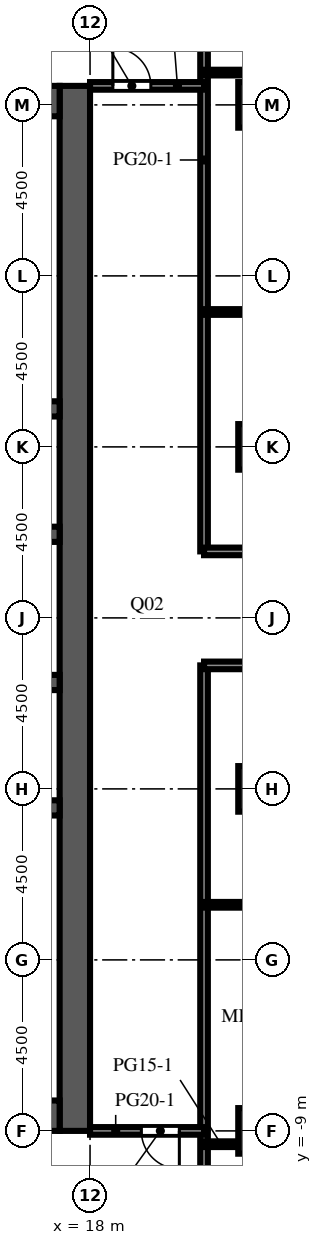
"""IFC4 building model, lengths in metres.
Left out: names, types, materials, properties, quantities, classifications, styles, units other than length and angle.
Written with IfcOpenShell. Run it as: python <this file> out.ifc"""

import sys

from ifc_helpers import new_model, si_unit, direction, frame, frame_2d, origin, origin_2d, place, context, subcontext, project, spatial, rectangle, extrude, element, fill, save


model = new_model("IFC4")
c1 = context("Model", 3, precision=1e-05, world=origin(), true_north=direction((0.0, 1.0)))
c2 = subcontext(c1, "Body", "Model", "MODEL_VIEW")
j1 = project(units=[si_unit("LENGTHUNIT", "METRE"), si_unit("PLANEANGLEUNIT", "RADIAN")], contexts=[c1])
p1 = place(None, origin())
s1 = spatial("IfcSite", under=j1, at=p1, CompositionType="ELEMENT")
p2 = place(p1, origin())
s2 = spatial("IfcBuilding", under=s1, at=p2, CompositionType="ELEMENT")
p3 = place(p2, frame((0.0, 0.0, 203.8)))
s3 = spatial("IfcBuildingStorey", under=s2, at=p3, CompositionType="ELEMENT", Elevation=203.8)
for number, where, z_axis, x_axis in (
    (1, (22.5, -9.0, 0.0), (0.0, 0.0, 1.0), (1.0, 0.0, 0.0)),
    (2, (22.5, 0.0, 0.0), (0.0, 0.0, 1.0), (1.0, 0.0, 0.0)),
    (3, (22.5, 9.0, 0.0), (0.0, 0.0, 1.0), (1.0, 0.0, 0.0)),
    (4, (22.5, 18.0, 0.0), (0.0, 0.0, 1.0), (1.0, 0.0, 0.0)),
):
    element("IfcColumn", number, at=place(p3, frame(where, z_axis=z_axis, x_axis=x_axis)), inside=s3, PredefinedType="COLUMN", context=c2, shape_type="SweptSolid", body=[
        extrude(rectangle(XDim=1.2, YDim=1.2, at=origin_2d()), origin(), (0.0, 0.0, 1.0), 4.1),
    ])
p4 = place(p3, frame((17.6, -9.0, 0.0), z_axis=(0.0, 0.0, 1.0), x_axis=(0.0, 1.0, 0.0)))
e5 = element("IfcWall", 5, at=p4, inside=s3, PredefinedType="SHEAR", context=c2, shape_type="SweptSolid", body=[
    extrude(rectangle(XDim=27.5, YDim=0.8, at=frame_2d((13.75, 0.0))), origin(), (0.0, 0.0, 1.0), 4.1),
])
p5 = place(p4, frame((12.55, 0.0, 0.0)))
e6 = element("IfcOpeningElement", 6, at=p5, cuts=e5, PredefinedType="OPENING", context=c2, shape_type="SweptSolid", body=[
    extrude(rectangle(XDim=2.4, YDim=2.4, at=frame_2d((1.2, 1.2))), frame((0.0, 0.41, 0.0), z_axis=(0.0, -1.0, 0.0), x_axis=(1.0, 0.0, 0.0)), (0.0, 0.0, 1.0), 0.82),
])
p6 = place(p4, frame((6.825, 0.0, 0.0)))
e7 = element("IfcOpeningElement", 7, at=p6, cuts=e5, PredefinedType="OPENING", context=c2, shape_type="SweptSolid", body=[
    extrude(rectangle(XDim=1.2, YDim=2.1, at=frame_2d((0.6, 1.05))), frame((0.0, 0.41, 0.0), z_axis=(0.0, -1.0, 0.0), x_axis=(1.0, 0.0, 0.0)), (0.0, 0.0, 1.0), 0.82),
])
p7 = place(p4, frame((19.475, 0.0, 0.0)))
e8 = element("IfcOpeningElement", 8, at=p7, cuts=e5, PredefinedType="OPENING", context=c2, shape_type="SweptSolid", body=[
    extrude(rectangle(XDim=1.2, YDim=2.1, at=frame_2d((0.6, 1.05))), frame((0.0, 0.41, 0.0), z_axis=(0.0, -1.0, 0.0), x_axis=(1.0, 0.0, 0.0)), (0.0, 0.0, 1.0), 0.82),
])
for number, where, z_axis, x_axis in (
    (9, (6.8, -8.6, 0.0), (0.0, 0.0, 1.0), (1.0, 0.0, 0.0)),
    (10, (6.8, 18.1, 0.0), (0.0, 0.0, 1.0), (1.0, 0.0, 0.0)),
):
    element("IfcWall", number, at=place(p3, frame(where, z_axis=z_axis, x_axis=x_axis)), inside=s3, PredefinedType="SHEAR", context=c2, shape_type="SweptSolid", body=[
        extrude(rectangle(XDim=10.4, YDim=0.8, at=frame_2d((5.2, 0.0))), origin(), (0.0, 0.0, 1.0), 4.1),
    ])
p8 = place(p3, frame((6.8, -0.5, 0.0), z_axis=(0.0, 0.0, 1.0), x_axis=(1.0, 0.0, 0.0)))
e11 = element("IfcWall", 11, at=p8, inside=s3, PredefinedType="SHEAR", context=c2, shape_type="SweptSolid", body=[
    extrude(rectangle(XDim=10.4, YDim=0.4, at=frame_2d((5.2, 0.0))), origin(), (0.0, 0.0, 1.0), 4.1),
])
p9 = place(p3, frame((6.8, 2.8, 0.0), z_axis=(0.0, 0.0, 1.0), x_axis=(1.0, 0.0, 0.0)))
e12 = element("IfcWall", 12, at=p9, inside=s3, PredefinedType="SHEAR", context=c2, shape_type="SweptSolid", body=[
    extrude(rectangle(XDim=10.4, YDim=0.4, at=frame_2d((5.2, 0.0))), origin(), (0.0, 0.0, 1.0), 4.1),
])
p10 = place(p9, frame((0.738, 0.0, 0.0)))
e13 = element("IfcOpeningElement", 13, at=p10, cuts=e12, PredefinedType="OPENING", context=c2, shape_type="SweptSolid", body=[
    extrude(rectangle(XDim=1.1, YDim=2.1, at=frame_2d((0.55, 1.05))), frame((0.0, 0.21, 0.0), z_axis=(0.0, -1.0, 0.0), x_axis=(1.0, 0.0, 0.0)), (0.0, 0.0, 1.0), 0.42),
])
p11 = place(p9, frame((3.337, 0.0, 0.0)))
e14 = element("IfcOpeningElement", 14, at=p11, cuts=e12, PredefinedType="OPENING", context=c2, shape_type="SweptSolid", body=[
    extrude(rectangle(XDim=1.1, YDim=2.1, at=frame_2d((0.55, 1.05))), frame((0.0, 0.21, 0.0), z_axis=(0.0, -1.0, 0.0), x_axis=(1.0, 0.0, 0.0)), (0.0, 0.0, 1.0), 0.42),
])
p12 = place(p9, frame((6.012, 0.0, 0.0)))
e15 = element("IfcOpeningElement", 15, at=p12, cuts=e12, PredefinedType="OPENING", context=c2, shape_type="SweptSolid", body=[
    extrude(rectangle(XDim=1.0, YDim=2.1, at=frame_2d((0.5, 1.05))), frame((0.0, 0.21, 0.0), z_axis=(0.0, -1.0, 0.0), x_axis=(1.0, 0.0, 0.0)), (0.0, 0.0, 1.0), 0.42),
])
p13 = place(p9, frame((8.613, 0.0, 0.0)))
e16 = element("IfcOpeningElement", 16, at=p13, cuts=e12, PredefinedType="OPENING", context=c2, shape_type="SweptSolid", body=[
    extrude(rectangle(XDim=1.0, YDim=2.1, at=frame_2d((0.5, 1.05))), frame((0.0, 0.21, 0.0), z_axis=(0.0, -1.0, 0.0), x_axis=(1.0, 0.0, 0.0)), (0.0, 0.0, 1.0), 0.42),
])
p14 = place(p3, frame((6.8, 6.7, 0.0), z_axis=(0.0, 0.0, 1.0), x_axis=(1.0, 0.0, 0.0)))
e17 = element("IfcWall", 17, at=p14, inside=s3, PredefinedType="SHEAR", context=c2, shape_type="SweptSolid", body=[
    extrude(rectangle(XDim=10.4, YDim=0.4, at=frame_2d((5.2, 0.0))), origin(), (0.0, 0.0, 1.0), 4.1),
])
p15 = place(p14, frame((3.337, 0.0, 0.0)))
e18 = element("IfcOpeningElement", 18, at=p15, cuts=e17, PredefinedType="OPENING", context=c2, shape_type="SweptSolid", body=[
    extrude(rectangle(XDim=1.1, YDim=2.1, at=frame_2d((0.55, 1.05))), frame((0.0, 0.21, 0.0), z_axis=(0.0, -1.0, 0.0), x_axis=(1.0, 0.0, 0.0)), (0.0, 0.0, 1.0), 0.42),
])
p16 = place(p14, frame((5.962, 0.0, 0.0)))
e19 = element("IfcOpeningElement", 19, at=p16, cuts=e17, PredefinedType="OPENING", context=c2, shape_type="SweptSolid", body=[
    extrude(rectangle(XDim=1.1, YDim=2.1, at=frame_2d((0.55, 1.05))), frame((0.0, 0.21, 0.0), z_axis=(0.0, -1.0, 0.0), x_axis=(1.0, 0.0, 0.0)), (0.0, 0.0, 1.0), 0.42),
])
p17 = place(p14, frame((8.663, 0.0, 0.0)))
e20 = element("IfcOpeningElement", 20, at=p17, cuts=e17, PredefinedType="OPENING", context=c2, shape_type="SweptSolid", body=[
    extrude(rectangle(XDim=1.1, YDim=2.1, at=frame_2d((0.55, 1.05))), frame((0.0, 0.21, 0.0), z_axis=(0.0, -1.0, 0.0), x_axis=(1.0, 0.0, 0.0)), (0.0, 0.0, 1.0), 0.42),
])
p18 = place(p14, frame((0.688, 0.0, 0.0)))
e21 = element("IfcOpeningElement", 21, at=p18, cuts=e17, PredefinedType="OPENING", context=c2, shape_type="SweptSolid", body=[
    extrude(rectangle(XDim=1.0, YDim=2.1, at=frame_2d((0.5, 1.05))), frame((0.0, 0.21, 0.0), z_axis=(0.0, -1.0, 0.0), x_axis=(1.0, 0.0, 0.0)), (0.0, 0.0, 1.0), 0.42),
])
p19 = place(p3, frame((6.8, 10.0, 0.0), z_axis=(0.0, 0.0, 1.0), x_axis=(1.0, 0.0, 0.0)))
e22 = element("IfcWall", 22, at=p19, inside=s3, PredefinedType="SHEAR", context=c2, shape_type="SweptSolid", body=[
    extrude(rectangle(XDim=10.4, YDim=0.4, at=frame_2d((5.2, 0.0))), origin(), (0.0, 0.0, 1.0), 4.1),
])
p20 = place(p3, frame((21.0, -26.85, 0.0), z_axis=(0.0, 0.0, 1.0), x_axis=(0.0, 1.0, 0.0)))
e23 = element("IfcWall", 23, at=p20, inside=s3, PredefinedType="PARTITIONING", context=c2, shape_type="SweptSolid", body=[
    extrude(rectangle(XDim=30.1, YDim=0.2, at=frame_2d((15.05, 0.0))), origin(), (0.0, 0.0, 1.0), 3.65),
])
p21 = place(p3, frame((21.0, 6.25, 0.0), z_axis=(0.0, 0.0, 1.0), x_axis=(0.0, 1.0, 0.0)))
e24 = element("IfcWall", 24, at=p21, inside=s3, PredefinedType="PARTITIONING", context=c2, shape_type="SweptSolid", body=[
    extrude(rectangle(XDim=20.6, YDim=0.2, at=frame_2d((10.3, 0.0))), origin(), (0.0, 0.0, 1.0), 3.65),
])
p22 = place(p3, frame((21.0, -9.35, 0.0), z_axis=(0.0, 0.0, 1.0), x_axis=(1.0, 0.0, 0.0)))
e25 = element("IfcWall", 25, at=p22, inside=s3, PredefinedType="PARTITIONING", context=c2, shape_type="SweptSolid", body=[
    extrude(rectangle(XDim=0.9, YDim=0.15, at=frame_2d((0.45, 0.0))), origin(), (0.0, 0.0, 1.0), 3.65),
])
p23 = place(p3, frame((21.0, -9.0, 0.0), z_axis=(0.0, 0.0, 1.0), x_axis=(-1.0, 0.0, 0.0)))
e26 = element("IfcWall", 26, at=p23, inside=s3, PredefinedType="PARTITIONING", context=c2, shape_type="SweptSolid", body=[
    extrude(rectangle(XDim=3.0, YDim=0.2, at=frame_2d((1.5, 0.0))), origin(), (0.0, 0.0, 1.0), 3.65),
])
p24 = place(p23, frame((0.65, 0.0, 0.0)))
e27 = element("IfcOpeningElement", 27, at=p24, cuts=e26, PredefinedType="OPENING", context=c2, shape_type="SweptSolid", body=[
    extrude(rectangle(XDim=1.0, YDim=2.1, at=frame_2d((0.5, 1.05))), frame((0.0, 0.11, 0.0), z_axis=(0.0, -1.0, 0.0), x_axis=(1.0, 0.0, 0.0)), (0.0, 0.0, 1.0), 0.22),
])
p25 = place(p3, frame((31.35, -3.05, 0.0), z_axis=(0.0, 0.0, 1.0), x_axis=(-1.0, 0.0, 0.0)))
e28 = element("IfcWall", 28, at=p25, inside=s3, PredefinedType="PARTITIONING", context=c2, shape_type="SweptSolid", body=[
    extrude(rectangle(XDim=10.35, YDim=0.15, at=frame_2d((5.175, 0.0))), origin(), (0.0, 0.0, 1.0), 3.65),
])
p26 = place(p25, frame((4.25, 0.0, 0.0)))
e29 = element("IfcOpeningElement", 29, at=p26, cuts=e28, PredefinedType="OPENING", context=c2, shape_type="SweptSolid", body=[
    extrude(rectangle(XDim=1.0, YDim=2.1, at=frame_2d((0.5, 1.05))), frame((0.0, 0.085, 0.0), z_axis=(0.0, -1.0, 0.0), x_axis=(1.0, 0.0, 0.0)), (0.0, 0.0, 1.0), 0.17),
])
p27 = place(p3, frame((31.35, 3.25, 0.0), z_axis=(0.0, 0.0, 1.0), x_axis=(-1.0, 0.0, 0.0)))
e30 = element("IfcWall", 30, at=p27, inside=s3, PredefinedType="PARTITIONING", context=c2, shape_type="SweptSolid", body=[
    extrude(rectangle(XDim=10.35, YDim=0.2, at=frame_2d((5.175, 0.0))), origin(), (0.0, 0.0, 1.0), 3.65),
])
p28 = place(p27, frame((5.5, 0.0, 0.0)))
e31 = element("IfcOpeningElement", 31, at=p28, cuts=e30, PredefinedType="OPENING", context=c2, shape_type="SweptSolid", body=[
    extrude(rectangle(XDim=1.0, YDim=2.1, at=frame_2d((0.5, 1.05))), frame((0.0, 0.11, 0.0), z_axis=(0.0, -1.0, 0.0), x_axis=(1.0, 0.0, 0.0)), (0.0, 0.0, 1.0), 0.22),
])
p29 = place(p3, frame((21.0, 6.25, 0.0), z_axis=(0.0, 0.0, 1.0), x_axis=(1.0, 0.0, 0.0)))
e32 = element("IfcWall", 32, at=p29, inside=s3, PredefinedType="PARTITIONING", context=c2, shape_type="SweptSolid", body=[
    extrude(rectangle(XDim=10.35, YDim=0.2, at=frame_2d((5.175, 0.0))), origin(), (0.0, 0.0, 1.0), 3.65),
])
p30 = place(p29, frame((5.6, 0.0, 0.0)))
e33 = element("IfcOpeningElement", 33, at=p30, cuts=e32, PredefinedType="OPENING", context=c2, shape_type="SweptSolid", body=[
    extrude(rectangle(XDim=1.0, YDim=2.1, at=frame_2d((0.5, 1.05))), frame((0.0, 0.11, 0.0), z_axis=(0.0, -1.0, 0.0), x_axis=(1.0, 0.0, 0.0)), (0.0, 0.0, 1.0), 0.22),
])
p31 = place(p3, frame((21.0, 12.55, 0.0), z_axis=(0.0, 0.0, 1.0), x_axis=(1.0, 0.0, 0.0)))
e34 = element("IfcWall", 34, at=p31, inside=s3, PredefinedType="PARTITIONING", context=c2, shape_type="SweptSolid", body=[
    extrude(rectangle(XDim=10.35, YDim=0.15, at=frame_2d((5.175, 0.0))), origin(), (0.0, 0.0, 1.0), 3.65),
])
p32 = place(p31, frame((4.6, 0.0, 0.0)))
e35 = element("IfcOpeningElement", 35, at=p32, cuts=e34, PredefinedType="OPENING", context=c2, shape_type="SweptSolid", body=[
    extrude(rectangle(XDim=1.0, YDim=2.1, at=frame_2d((0.5, 1.05))), frame((0.0, 0.085, 0.0), z_axis=(0.0, -1.0, 0.0), x_axis=(1.0, 0.0, 0.0)), (0.0, 0.0, 1.0), 0.17),
])
p33 = place(p3, frame((18.0, 18.5, 0.0), z_axis=(0.0, 0.0, 1.0), x_axis=(1.0, 0.0, 0.0)))
e36 = element("IfcWall", 36, at=p33, inside=s3, PredefinedType="PARTITIONING", context=c2, shape_type="SweptSolid", body=[
    extrude(rectangle(XDim=3.0, YDim=0.2, at=frame_2d((1.5, 0.0))), origin(), (0.0, 0.0, 1.0), 3.65),
])
p34 = place(p33, frame((0.6, 0.0, 0.0)))
e37 = element("IfcOpeningElement", 37, at=p34, cuts=e36, PredefinedType="OPENING", context=c2, shape_type="SweptSolid", body=[
    extrude(rectangle(XDim=1.0, YDim=2.1, at=frame_2d((0.5, 1.05))), frame((0.0, 0.11, 0.0), z_axis=(0.0, -1.0, 0.0), x_axis=(1.0, 0.0, 0.0)), (0.0, 0.0, 1.0), 0.22),
])
p35 = place(p3, frame((21.0, 18.85, 0.0), z_axis=(0.0, 0.0, 1.0), x_axis=(1.0, 0.0, 0.0)))
e38 = element("IfcWall", 38, at=p35, inside=s3, PredefinedType="PARTITIONING", context=c2, shape_type="SweptSolid", body=[
    extrude(rectangle(XDim=10.35, YDim=0.15, at=frame_2d((5.175, 0.0))), origin(), (0.0, 0.0, 1.0), 3.65),
])
p36 = place(p35, frame((6.85, 0.0, 0.0)))
e39 = element("IfcOpeningElement", 39, at=p36, cuts=e38, PredefinedType="OPENING", context=c2, shape_type="SweptSolid", body=[
    extrude(rectangle(XDim=1.0, YDim=2.1, at=frame_2d((0.5, 1.05))), frame((0.0, 0.085, 0.0), z_axis=(0.0, -1.0, 0.0), x_axis=(1.0, 0.0, 0.0)), (0.0, 0.0, 1.0), 0.17),
])
p37 = place(p5, origin())
e40 = element("IfcDoor", 40, at=p37, inside=s3, OperationType="DOUBLE_DOOR_DOUBLE_SWING", PredefinedType="DOOR", context=c2, shape_type="SweptSolid", body=[
    extrude(rectangle(XDim=2.4, YDim=2.4, at=frame_2d((1.2, 1.2))), frame((0.0, 0.025, 0.0), z_axis=(0.0, -1.0, 0.0), x_axis=(1.0, 0.0, 0.0)), (0.0, 0.0, 1.0), 0.05),
])
fill(e6, e40)
p38 = place(p6, frame((1.2, 0.0, 0.0), z_axis=(0.0, 0.0, 1.0), x_axis=(-1.0, 0.0, 0.0)))
e41 = element("IfcDoor", 41, at=p38, inside=s3, OperationType="SINGLE_SWING_LEFT", PredefinedType="DOOR", context=c2, shape_type="SweptSolid", body=[
    extrude(rectangle(XDim=1.2, YDim=2.1, at=frame_2d((0.6, 1.05))), frame((0.0, 0.025, 0.0), z_axis=(0.0, -1.0, 0.0), x_axis=(1.0, 0.0, 0.0)), (0.0, 0.0, 1.0), 0.05),
])
fill(e7, e41)
p39 = place(p7, frame((1.2, 0.0, 0.0), z_axis=(0.0, 0.0, 1.0), x_axis=(-1.0, 0.0, 0.0)))
e42 = element("IfcDoor", 42, at=p39, inside=s3, OperationType="SINGLE_SWING_LEFT", PredefinedType="DOOR", context=c2, shape_type="SweptSolid", body=[
    extrude(rectangle(XDim=1.2, YDim=2.1, at=frame_2d((0.6, 1.05))), frame((0.0, 0.025, 0.0), z_axis=(0.0, -1.0, 0.0), x_axis=(1.0, 0.0, 0.0)), (0.0, 0.0, 1.0), 0.05),
])
fill(e8, e42)
p40 = place(p24, origin())
e43 = element("IfcDoor", 43, at=p40, inside=s3, OperationType="SINGLE_SWING_LEFT", PredefinedType="DOOR", context=c2, shape_type="SweptSolid", body=[
    extrude(rectangle(XDim=1.0, YDim=2.1, at=frame_2d((0.5, 1.05))), frame((0.0, 0.025, 0.0), z_axis=(0.0, -1.0, 0.0), x_axis=(1.0, 0.0, 0.0)), (0.0, 0.0, 1.0), 0.05),
])
fill(e27, e43)
p41 = place(p34, origin())
e44 = element("IfcDoor", 44, at=p41, inside=s3, OperationType="SINGLE_SWING_LEFT", PredefinedType="DOOR", context=c2, shape_type="SweptSolid", body=[
    extrude(rectangle(XDim=1.0, YDim=2.1, at=frame_2d((0.5, 1.05))), frame((0.0, 0.025, 0.0), z_axis=(0.0, -1.0, 0.0), x_axis=(1.0, 0.0, 0.0)), (0.0, 0.0, 1.0), 0.05),
])
fill(e37, e44)
save(model, sys.argv[1])
